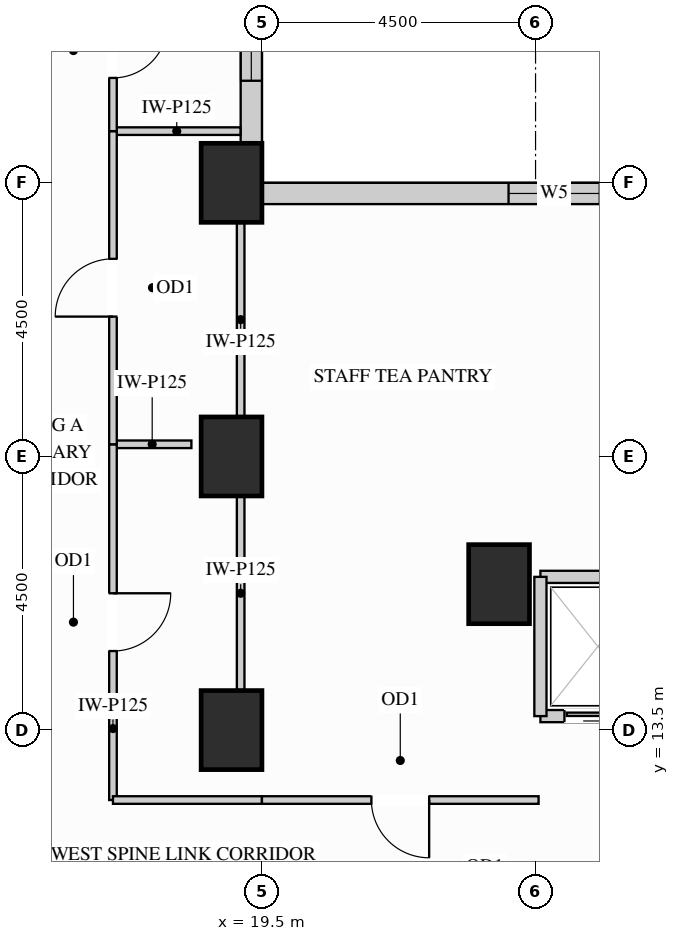
"""IFC4 building model, lengths in metres.
Left out: names, types, materials, properties, quantities, classifications, styles, units other than length and angle.
Written with IfcOpenShell. Run it as: python <this file> out.ifc"""

import sys

from ifc_helpers import new_model, si_unit, direction, frame, frame_2d, origin, origin_2d, place, context, subcontext, project, spatial, rectangle, extrude, source, transform, mapped, element, fill, save


model = new_model("IFC4")
c1 = context("Model", 3, precision=1e-05, world=origin(), true_north=direction((0.0, 1.0)))
c2 = subcontext(c1, "Body", "Model", "MODEL_VIEW")
j1 = project(units=[si_unit("LENGTHUNIT", "METRE"), si_unit("PLANEANGLEUNIT", "RADIAN")], contexts=[c1])
p1 = place(None, origin())
s1 = spatial("IfcSite", under=j1, at=p1, CompositionType="ELEMENT")
p2 = place(p1, origin())
s2 = spatial("IfcBuilding", under=s1, at=p2, CompositionType="ELEMENT")
p3 = place(p2, frame((0.0, 0.0, 26.1)))
s3 = spatial("IfcBuildingStorey", under=s2, at=p3, CompositionType="ELEMENT", Elevation=26.1)
m1 = source(origin(), c2, "Body", "SweptSolid", [
    extrude(rectangle(XDim=1.0, YDim=1.3, at=origin_2d()), origin(), (0.0, 0.0, 1.0), 3.38),
])
for number, where, z_axis, x_axis in (
    (1, (19.0, 13.5, 0.0), (0.0, 0.0, 1.0), (1.0, 0.0, 0.0)),
    (2, (19.0, 18.0, 0.0), (0.0, 0.0, 1.0), (1.0, 0.0, 0.0)),
    (3, (19.0, 22.5, 0.0), (0.0, 0.0, 1.0), (1.0, 0.0, 0.0)),
    (4, (23.4, 15.9, 0.0), (0.0, 0.0, 1.0), (1.0, 0.0, 0.0)),
):
    element("IfcColumn", number, at=place(p3, frame(where, z_axis=z_axis, x_axis=x_axis)), inside=s3, PredefinedType="COLUMN", context=c2, shape_type="MappedRepresentation", body=[
        mapped(m1, transform((0.0, 0.0, 0.0), x_axis=(1.0, 0.0, 0.0), y_axis=(0.0, 1.0, 0.0), z_axis=(0.0, 0.0, 1.0))),
    ])
p4 = place(p3, frame((34.352, 22.325, 0.0), z_axis=(0.0, 0.0, 1.0), x_axis=(-1.0, 0.0, 0.0)))
e5 = element("IfcWall", 5, at=p4, inside=s3, PredefinedType="SOLIDWALL", context=c2, shape_type="SweptSolid", body=[
    extrude(rectangle(XDim=14.854, YDim=0.35, at=frame_2d((7.427, 0.0))), origin(), (0.0, 0.0, 1.0), 3.365),
])
p5 = place(p4, frame((4.058, 0.0, 0.78)))
e6 = element("IfcOpeningElement", 6, at=p5, cuts=e5, PredefinedType="OPENING", context=c2, shape_type="SweptSolid", body=[
    extrude(rectangle(XDim=1.5, YDim=2.0, at=frame_2d((0.75, 1.0))), frame((0.0, 0.185, 0.0), z_axis=(0.0, -1.0, 0.0), x_axis=(1.0, 0.0, 0.0)), (0.0, 0.0, 1.0), 0.37),
])
p6 = place(p4, frame((9.296, 0.0, 0.78)))
e7 = element("IfcOpeningElement", 7, at=p6, cuts=e5, PredefinedType="OPENING", context=c2, shape_type="SweptSolid", body=[
    extrude(rectangle(XDim=1.5, YDim=2.0, at=frame_2d((0.75, 1.0))), frame((0.0, 0.185, 0.0), z_axis=(0.0, -1.0, 0.0), x_axis=(1.0, 0.0, 0.0)), (0.0, 0.0, 1.0), 0.37),
])
p7 = place(p3, frame((19.325, 23.148, 0.0), z_axis=(0.0, 0.0, 1.0), x_axis=(0.0, 1.0, 0.0)))
e8 = element("IfcWall", 8, at=p7, inside=s3, PredefinedType="SOLIDWALL", context=c2, shape_type="SweptSolid", body=[
    extrude(rectangle(XDim=3.004, YDim=0.35, at=frame_2d((1.502, 0.0))), origin(), (0.0, 0.0, 1.0), 2.51),
])
p8 = place(p7, frame((1.031, 0.0, 0.78)))
e9 = element("IfcOpeningElement", 9, at=p8, cuts=e8, PredefinedType="OPENING", context=c2, shape_type="SweptSolid", body=[
    extrude(rectangle(XDim=1.5, YDim=1.55, at=frame_2d((0.75, 0.775))), frame((0.0, 0.185, 0.0), z_axis=(0.0, -1.0, 0.0), x_axis=(1.0, 0.0, 0.0)), (0.0, 0.0, 1.0), 0.37),
])
m2 = source(origin(), c2, "Body", "SweptSolid", [
    extrude(rectangle(XDim=1.29, YDim=0.125, at=frame_2d((0.645, 0.0))), origin(), (0.0, 0.0, 1.0), 2.67),
])
p9 = place(p3, frame((17.05, 18.2, 0.0), z_axis=(0.0, 0.0, 1.0), x_axis=(1.0, 0.0, 0.0)))
e10 = element("IfcWall", 10, at=p9, inside=s3, PredefinedType="PARTITIONING", context=c2, shape_type="MappedRepresentation", body=[
    mapped(m2, transform((0.0, 0.0, 0.0), x_axis=(1.0, 0.0, 0.0), y_axis=(0.0, 1.0, 0.0), z_axis=(0.0, 0.0, 1.0))),
])
m3 = source(origin(), c2, "Body", "SweptSolid", [
    extrude(rectangle(XDim=2.098, YDim=0.125, at=frame_2d((1.049, 0.0))), origin(), (0.0, 0.0, 1.0), 3.365),
])
p10 = place(p3, frame((17.05, 23.35, 0.0), z_axis=(0.0, 0.0, 1.0), x_axis=(1.0, 0.0, 0.0)))
e11 = element("IfcWall", 11, at=p10, inside=s3, PredefinedType="PARTITIONING", context=c2, shape_type="MappedRepresentation", body=[
    mapped(m3, transform((0.0, 0.0, 0.0), x_axis=(1.0, 0.0, 0.0), y_axis=(0.0, 1.0, 0.0), z_axis=(0.0, 0.0, 1.0))),
])
m4 = source(origin(), c2, "Body", "SweptSolid", [
    extrude(rectangle(XDim=3.18, YDim=0.125, at=frame_2d((1.59, 0.0))), origin(), (0.0, 0.0, 1.0), 2.67),
])
for number, where, z_axis, x_axis in (
    (12, (19.15, 14.16, 0.0), (0.0, 0.0, 1.0), (0.0, 1.0, 0.0)),
    (13, (19.15, 18.66, 0.0), (0.0, 0.0, 1.0), (0.0, 1.0, 0.0)),
):
    element("IfcWall", number, at=place(p3, frame(where, z_axis=z_axis, x_axis=x_axis)), inside=s3, PredefinedType="PARTITIONING", context=c2, shape_type="MappedRepresentation", body=[
        mapped(m4, transform((0.0, 0.0, 0.0), x_axis=(1.0, 0.0, 0.0), y_axis=(0.0, 1.0, 0.0), z_axis=(0.0, 0.0, 1.0))),
    ])
p11 = place(p3, frame((17.05, 12.35, 0.0), z_axis=(0.0, 0.0, 1.0), x_axis=(0.0, 1.0, 0.0)))
e14 = element("IfcWall", 14, at=p11, inside=s3, PredefinedType="PARTITIONING", context=c2, shape_type="SweptSolid", body=[
    extrude(rectangle(XDim=5.85, YDim=0.125, at=frame_2d((2.925, 0.0))), origin(), (0.0, 0.0, 1.0), 3.365),
])
p12 = place(p11, frame((2.45, 0.0, 0.0)))
e15 = element("IfcOpeningElement", 15, at=p12, cuts=e14, PredefinedType="OPENING", context=c2, shape_type="SweptSolid", body=[
    extrude(rectangle(XDim=0.95, YDim=2.15, at=frame_2d((0.475, 1.075))), frame((0.0, 0.073, 0.0), z_axis=(0.0, -1.0, 0.0), x_axis=(1.0, 0.0, 0.0)), (0.0, 0.0, 1.0), 0.145),
])
p13 = place(p3, frame((17.05, 18.2, 0.0), z_axis=(0.0, 0.0, 1.0), x_axis=(0.0, 1.0, 0.0)))
e16 = element("IfcWall", 16, at=p13, inside=s3, PredefinedType="PARTITIONING", context=c2, shape_type="SweptSolid", body=[
    extrude(rectangle(XDim=5.15, YDim=0.125, at=frame_2d((2.575, 0.0))), origin(), (0.0, 0.0, 1.0), 3.365),
])
p14 = place(p13, frame((2.1, 0.0, 0.0)))
e17 = element("IfcOpeningElement", 17, at=p14, cuts=e16, PredefinedType="OPENING", context=c2, shape_type="SweptSolid", body=[
    extrude(rectangle(XDim=0.95, YDim=2.15, at=frame_2d((0.475, 1.075))), frame((0.0, 0.073, 0.0), z_axis=(0.0, -1.0, 0.0), x_axis=(1.0, 0.0, 0.0)), (0.0, 0.0, 1.0), 0.145),
])
p15 = place(p3, frame((17.05, 23.35, 0.0), z_axis=(0.0, 0.0, 1.0), x_axis=(0.0, 1.0, 0.0)))
e18 = element("IfcWall", 18, at=p15, inside=s3, PredefinedType="PARTITIONING", context=c2, shape_type="SweptSolid", body=[
    extrude(rectangle(XDim=2.7, YDim=0.125, at=frame_2d((1.35, 0.0))), origin(), (0.0, 0.0, 1.0), 3.365),
])
p16 = place(p15, frame((0.875, 0.0, 0.0)))
e19 = element("IfcOpeningElement", 19, at=p16, cuts=e18, PredefinedType="OPENING", context=c2, shape_type="SweptSolid", body=[
    extrude(rectangle(XDim=0.9, YDim=2.15, at=frame_2d((0.45, 1.075))), frame((0.0, 0.073, 0.0), z_axis=(0.0, -1.0, 0.0), x_axis=(1.0, 0.0, 0.0)), (0.0, 0.0, 1.0), 0.145),
])
m5 = source(origin(), c2, "Body", "SweptSolid", [
    extrude(rectangle(XDim=2.45, YDim=0.125, at=frame_2d((1.225, 0.0))), origin(), (0.0, 0.0, 1.0), 3.365),
])
p17 = place(p3, frame((17.05, 12.35, 0.0), z_axis=(0.0, 0.0, 1.0), x_axis=(1.0, 0.0, 0.0)))
e20 = element("IfcWall", 20, at=p17, inside=s3, PredefinedType="PARTITIONING", context=c2, shape_type="MappedRepresentation", body=[
    mapped(m5, transform((0.0, 0.0, 0.0), x_axis=(1.0, 0.0, 0.0), y_axis=(0.0, 1.0, 0.0), z_axis=(0.0, 0.0, 1.0))),
])
p18 = place(p3, frame((19.5, 12.35, 0.0), z_axis=(0.0, 0.0, 1.0), x_axis=(1.0, 0.0, 0.0)))
e21 = element("IfcWall", 21, at=p18, inside=s3, PredefinedType="PARTITIONING", context=c2, shape_type="SweptSolid", body=[
    extrude(rectangle(XDim=4.55, YDim=0.125, at=frame_2d((2.275, 0.0))), origin(), (0.0, 0.0, 1.0), 3.365),
])
p19 = place(p18, frame((1.8, 0.0, 0.0)))
e22 = element("IfcOpeningElement", 22, at=p19, cuts=e21, PredefinedType="OPENING", context=c2, shape_type="SweptSolid", body=[
    extrude(rectangle(XDim=0.95, YDim=2.15, at=frame_2d((0.475, 1.075))), frame((0.0, 0.073, 0.0), z_axis=(0.0, -1.0, 0.0), x_axis=(1.0, 0.0, 0.0)), (0.0, 0.0, 1.0), 0.145),
])
m6 = source(origin(), c2, "Body", "SweptSolid", [
    extrude(rectangle(XDim=1.89, YDim=0.2, at=frame_2d((0.945, 0.0))), origin(), (0.0, 0.0, 1.0), 2.67),
])
p20 = place(p3, frame((24.08, 16.02, 0.0), z_axis=(0.0, 0.0, 1.0), x_axis=(1.0, 0.0, 0.0)))
e23 = element("IfcWall", 23, at=p20, inside=s3, PredefinedType="PARTITIONING", context=c2, shape_type="MappedRepresentation", body=[
    mapped(m6, transform((0.0, 0.0, 0.0), x_axis=(1.0, 0.0, 0.0), y_axis=(0.0, 1.0, 0.0), z_axis=(0.0, 0.0, 1.0))),
])
p21 = place(p3, frame((24.08, 13.73, 0.0), z_axis=(0.0, 0.0, 1.0), x_axis=(1.0, 0.0, 0.0)))
e24 = element("IfcWall", 24, at=p21, inside=s3, PredefinedType="PARTITIONING", context=c2, shape_type="SweptSolid", body=[
    extrude(rectangle(XDim=1.89, YDim=0.2, at=frame_2d((0.945, 0.0))), origin(), (0.0, 0.0, 1.0), 2.446),
])
p22 = place(p21, frame((0.395, 0.0, 0.0)))
e25 = element("IfcOpeningElement", 25, at=p22, cuts=e24, PredefinedType="OPENING", context=c2, shape_type="SweptSolid", body=[
    extrude(rectangle(XDim=1.1, YDim=2.2, at=frame_2d((0.55, 1.1))), frame((0.0, 0.11, 0.0), z_axis=(0.0, -1.0, 0.0), x_axis=(1.0, 0.0, 0.0)), (0.0, 0.0, 1.0), 0.22),
])
m7 = source(origin(), c2, "Body", "SweptSolid", [
    extrude(rectangle(XDim=2.29, YDim=0.2, at=frame_2d((1.145, 0.0))), origin(), (0.0, 0.0, 1.0), 3.365),
])
p23 = place(p3, frame((24.08, 13.73, 0.0), z_axis=(0.0, 0.0, 1.0), x_axis=(0.0, 1.0, 0.0)))
e26 = element("IfcWall", 26, at=p23, inside=s3, PredefinedType="PARTITIONING", context=c2, shape_type="MappedRepresentation", body=[
    mapped(m7, transform((0.0, 0.0, 0.0), x_axis=(1.0, 0.0, 0.0), y_axis=(0.0, 1.0, 0.0), z_axis=(0.0, 0.0, 1.0))),
])
m8 = source(origin(), c2, "Body", "SweptSolid", [
    extrude(rectangle(XDim=1.1, YDim=2.2, at=frame_2d((0.55, 1.1))), frame((0.0, 0.025, 0.0), z_axis=(0.0, -1.0, 0.0), x_axis=(1.0, 0.0, 0.0)), (0.0, 0.0, 1.0), 0.05),
])
p24 = place(p22, origin())
e27 = element("IfcDoor", 27, at=p24, inside=s3, OperationType="SLIDING_TO_LEFT", PredefinedType="DOOR", context=c2, shape_type="MappedRepresentation", body=[
    mapped(m8, transform((0.0, 0.0, 0.0), x_axis=(1.0, 0.0, 0.0), y_axis=(0.0, 1.0, 0.0), z_axis=(0.0, 0.0, 1.0))),
])
fill(e25, e27)
m9 = source(origin(), c2, "Body", "SweptSolid", [
    extrude(rectangle(XDim=0.95, YDim=2.15, at=frame_2d((0.475, 1.075))), frame((0.0, 0.025, 0.0), z_axis=(0.0, -1.0, 0.0), x_axis=(1.0, 0.0, 0.0)), (0.0, 0.0, 1.0), 0.05),
])
p25 = place(p12, origin())
e28 = element("IfcDoor", 28, at=p25, inside=s3, OperationType="SINGLE_SWING_RIGHT", PredefinedType="DOOR", context=c2, shape_type="MappedRepresentation", body=[
    mapped(m9, transform((0.0, 0.0, 0.0), x_axis=(1.0, 0.0, 0.0), y_axis=(0.0, 1.0, 0.0), z_axis=(0.0, 0.0, 1.0))),
])
fill(e15, e28)
p26 = place(p14, origin())
e29 = element("IfcDoor", 29, at=p26, inside=s3, OperationType="SINGLE_SWING_LEFT", PredefinedType="DOOR", context=c2, shape_type="MappedRepresentation", body=[
    mapped(m9, transform((0.0, 0.0, 0.0), x_axis=(1.0, 0.0, 0.0), y_axis=(0.0, 1.0, 0.0), z_axis=(0.0, 0.0, 1.0))),
])
fill(e17, e29)
p27 = place(p19, origin())
e30 = element("IfcDoor", 30, at=p27, inside=s3, OperationType="SINGLE_SWING_RIGHT", PredefinedType="DOOR", context=c2, shape_type="MappedRepresentation", body=[
    mapped(m9, transform((0.0, 0.0, 0.0), x_axis=(1.0, 0.0, 0.0), y_axis=(0.0, 1.0, 0.0), z_axis=(0.0, 0.0, 1.0))),
])
fill(e22, e30)
m10 = source(origin(), c2, "Body", "SweptSolid", [
    extrude(rectangle(XDim=0.9, YDim=2.15, at=frame_2d((0.45, 1.075))), frame((0.0, 0.025, 0.0), z_axis=(0.0, -1.0, 0.0), x_axis=(1.0, 0.0, 0.0)), (0.0, 0.0, 1.0), 0.05),
])
p28 = place(p16, origin())
e31 = element("IfcDoor", 31, at=p28, inside=s3, OperationType="SINGLE_SWING_RIGHT", PredefinedType="DOOR", context=c2, shape_type="MappedRepresentation", body=[
    mapped(m10, transform((0.0, 0.0, 0.0), x_axis=(1.0, 0.0, 0.0), y_axis=(0.0, 1.0, 0.0), z_axis=(0.0, 0.0, 1.0))),
])
fill(e19, e31)
m11 = source(origin(), c2, "Body", "SweptSolid", [
    extrude(rectangle(XDim=1.5, YDim=2.0, at=frame_2d((0.75, 1.0))), frame((0.0, 0.03, 0.0), z_axis=(0.0, -1.0, 0.0), x_axis=(1.0, 0.0, 0.0)), (0.0, 0.0, 1.0), 0.06),
])
p29 = place(p6, origin())
e32 = element("IfcWindow", 32, at=p29, inside=s3, PartitioningType="SINGLE_PANEL", PredefinedType="WINDOW", context=c2, shape_type="MappedRepresentation", body=[
    mapped(m11, transform((0.0, 0.0, 0.0), x_axis=(1.0, 0.0, 0.0), y_axis=(0.0, 1.0, 0.0), z_axis=(0.0, 0.0, 1.0))),
])
fill(e7, e32)
m12 = source(origin(), c2, "Body", "SweptSolid", [
    extrude(rectangle(XDim=1.5, YDim=1.55, at=frame_2d((0.75, 0.775))), frame((0.0, 0.03, 0.0), z_axis=(0.0, -1.0, 0.0), x_axis=(1.0, 0.0, 0.0)), (0.0, 0.0, 1.0), 0.06),
])
p30 = place(p8, origin())
e33 = element("IfcWindow", 33, at=p30, inside=s3, PartitioningType="SINGLE_PANEL", PredefinedType="WINDOW", context=c2, shape_type="MappedRepresentation", body=[
    mapped(m12, transform((0.0, 0.0, 0.0), x_axis=(1.0, 0.0, 0.0), y_axis=(0.0, 1.0, 0.0), z_axis=(0.0, 0.0, 1.0))),
])
fill(e9, e33)
save(model, sys.argv[1])
